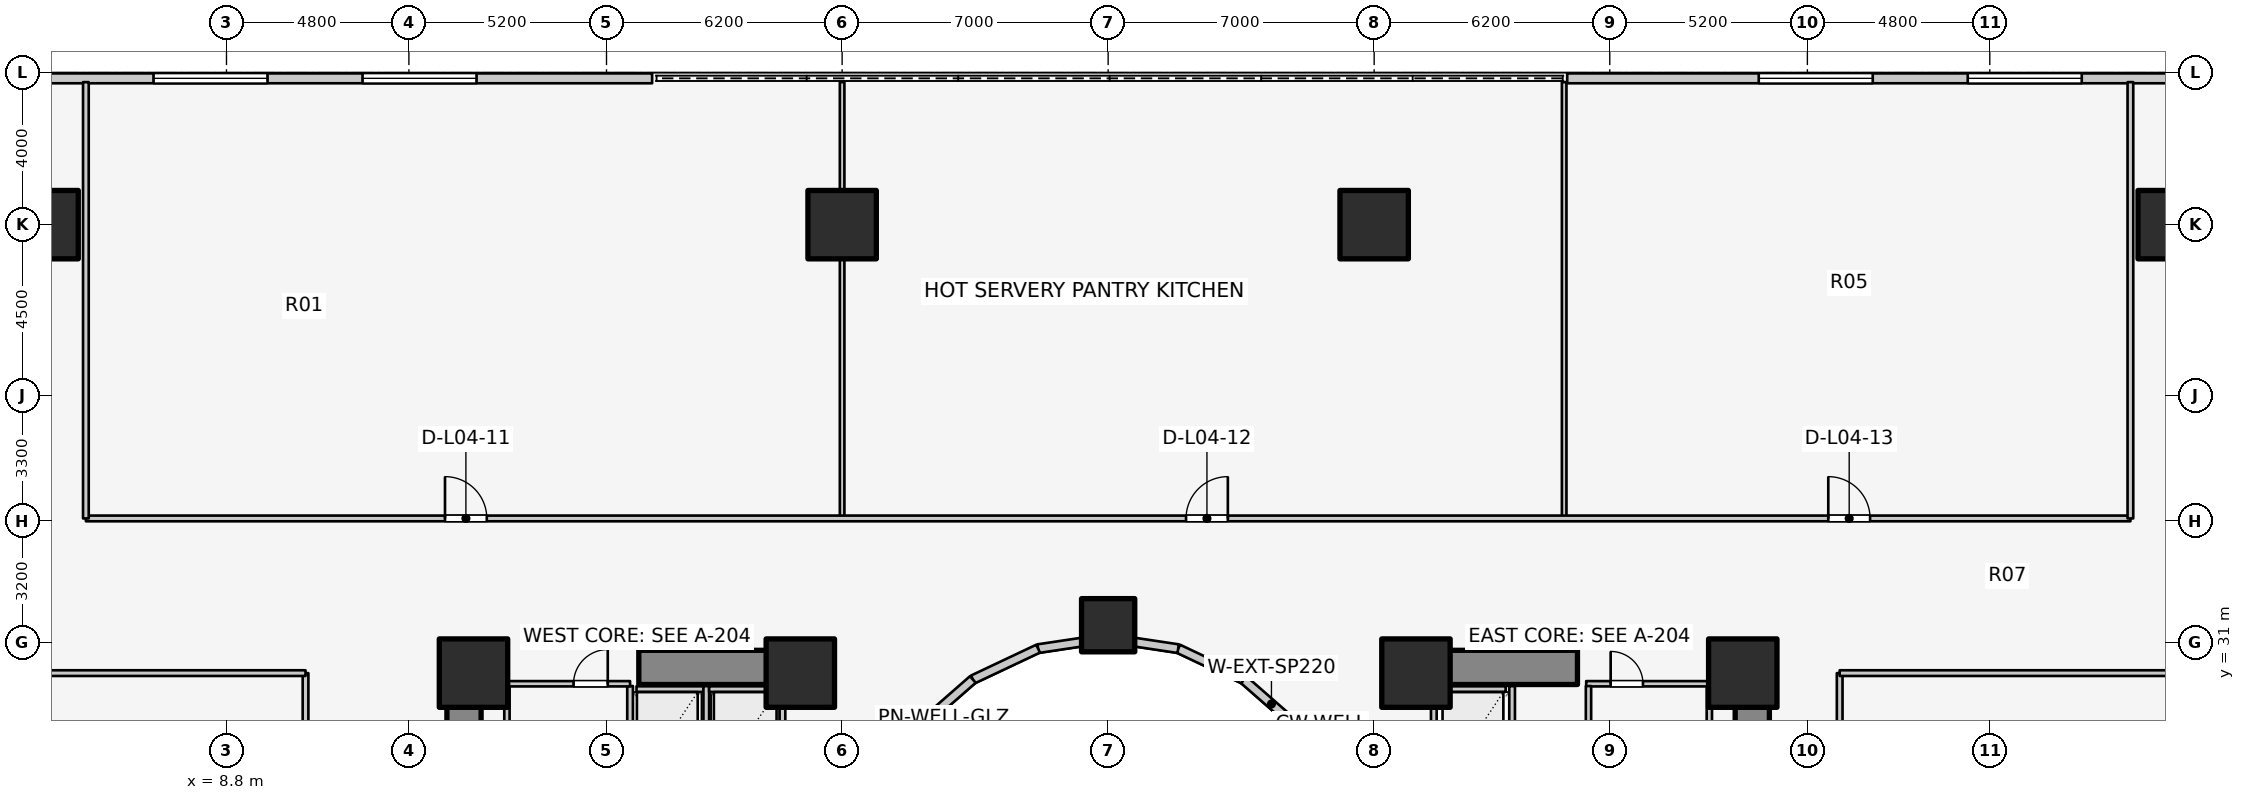
"""IFC4 building model, lengths in metres.
Left out: names, types, materials, properties, quantities, classifications, styles, units other than length and angle.
Written with IfcOpenShell. Run it as: python <this file> out.ifc"""

import sys

from ifc_helpers import new_model, si_unit, direction, frame, frame_2d, origin, origin_2d, place, context, subcontext, project, spatial, rectangle, extrude, element, fill, save


model = new_model("IFC4")
c1 = context("Model", 3, precision=1e-05, world=origin(), true_north=direction((0.0, 1.0)))
c2 = subcontext(c1, "Body", "Model", "MODEL_VIEW")
j1 = project(units=[si_unit("LENGTHUNIT", "METRE"), si_unit("PLANEANGLEUNIT", "RADIAN")], contexts=[c1])
p1 = place(None, origin())
s1 = spatial("IfcSite", under=j1, at=p1, CompositionType="ELEMENT")
p2 = place(p1, origin())
s2 = spatial("IfcBuilding", under=s1, at=p2, CompositionType="ELEMENT")
p3 = place(p2, frame((0.0, 0.0, 13.8)))
s3 = spatial("IfcBuildingStorey", under=s2, at=p3, CompositionType="ELEMENT", Elevation=13.8)
p4 = place(p3, frame((15.05, 17.05, 0.0), z_axis=(0.0, 0.0, 1.0), x_axis=(0.0, 1.0, 0.0)))
e1 = element("IfcWall", 1, at=p4, inside=s3, PredefinedType="SHEAR", context=c2, shape_type="SweptSolid", body=[
    extrude(rectangle(XDim=12.8, YDim=0.9, at=frame_2d((6.4, 0.0))), origin(), (0.0, 0.0, 1.0), 4.6),
])
p5 = place(p3, frame((19.65, 30.35, 0.0), z_axis=(0.0, 0.0, 1.0), x_axis=(1.0, 0.0, 0.0)))
e2 = element("IfcWall", 2, at=p5, inside=s3, PredefinedType="SHEAR", context=c2, shape_type="SweptSolid", body=[
    extrude(rectangle(XDim=4.5, YDim=0.9, at=frame_2d((2.25, 0.0))), origin(), (0.0, 0.0, 1.0), 4.6),
])
p6 = place(p3, frame((48.95, 17.05, 0.0), z_axis=(0.0, 0.0, 1.0), x_axis=(0.0, 1.0, 0.0)))
e3 = element("IfcWall", 3, at=p6, inside=s3, PredefinedType="SHEAR", context=c2, shape_type="SweptSolid", body=[
    extrude(rectangle(XDim=12.8, YDim=0.9, at=frame_2d((6.4, 0.0))), origin(), (0.0, 0.0, 1.0), 4.6),
])
p7 = place(p3, frame((39.85, 30.35, 0.0), z_axis=(0.0, 0.0, 1.0), x_axis=(1.0, 0.0, 0.0)))
e4 = element("IfcWall", 4, at=p7, inside=s3, PredefinedType="SHEAR", context=c2, shape_type="SweptSolid", body=[
    extrude(rectangle(XDim=4.5, YDim=0.9, at=frame_2d((2.25, 0.0))), origin(), (0.0, 0.0, 1.0), 4.6),
])
for number, where, z_axis, x_axis in (
    (5, (23.9, 30.2, 0.0), (0.0, 0.0, 1.0), (1.0, 0.0, 0.0)),
    (6, (15.3, 30.2, 0.0), (0.0, 0.0, 1.0), (1.0, 0.0, 0.0)),
    (7, (48.7, 30.2, 0.0), (0.0, 0.0, 1.0), (1.0, 0.0, 0.0)),
    (8, (40.1, 30.2, 0.0), (0.0, 0.0, 1.0), (1.0, 0.0, 0.0)),
    (9, (60.0, 42.0, 0.0), (0.0, 0.0, 1.0), (1.0, 0.0, 0.0)),
    (10, (39.0, 42.0, 0.0), (0.0, 0.0, 1.0), (1.0, 0.0, 0.0)),
    (11, (25.0, 42.0, 0.0), (0.0, 0.0, 1.0), (1.0, 0.0, 0.0)),
    (12, (4.0, 42.0, 0.0), (0.0, 0.0, 1.0), (1.0, 0.0, 0.0)),
):
    element("IfcColumn", number, at=place(p3, frame(where, z_axis=z_axis, x_axis=x_axis)), inside=s3, PredefinedType="COLUMN", context=c2, shape_type="SweptSolid", body=[
        extrude(rectangle(XDim=1.8, YDim=1.8, at=origin_2d()), origin(), (0.0, 0.0, 1.0), 4.6),
    ])
p8 = place(p3, frame((32.0, 31.46, 0.0), z_axis=(0.0, 0.0, 1.0), x_axis=(1.0, 0.0, 0.0)))
e13 = element("IfcColumn", 13, at=p8, inside=s3, PredefinedType="COLUMN", context=c2, shape_type="SweptSolid", body=[
    extrude(rectangle(XDim=1.4, YDim=1.4, at=origin_2d()), origin(), (0.0, 0.0, 1.0), 4.6),
])
p9 = place(p3, frame((63.72, 45.85, 0.0), z_axis=(0.0, 0.0, 1.0), x_axis=(-1.0, 0.0, 0.0)))
e14 = element("IfcWall", 14, at=p9, inside=s3, PredefinedType="STANDARD", context=c2, shape_type="SweptSolid", body=[
    extrude(rectangle(XDim=19.64, YDim=0.26, at=frame_2d((9.82, 0.0))), origin(), (0.0, 0.0, 1.0), 4.28),
])
p10 = place(p9, frame((6.1, 0.0, 0.9)))
e15 = element("IfcOpeningElement", 15, at=p10, cuts=e14, PredefinedType="OPENING", context=c2, shape_type="SweptSolid", body=[
    extrude(rectangle(XDim=3.0, YDim=2.4, at=frame_2d((1.5, 1.2))), frame((0.0, 0.14, 0.0), z_axis=(0.0, -1.0, 0.0), x_axis=(1.0, 0.0, 0.0)), (0.0, 0.0, 1.0), 0.28),
])
p11 = place(p9, frame((11.6, 0.0, 0.9)))
e16 = element("IfcOpeningElement", 16, at=p11, cuts=e14, PredefinedType="OPENING", context=c2, shape_type="SweptSolid", body=[
    extrude(rectangle(XDim=3.0, YDim=2.4, at=frame_2d((1.5, 1.2))), frame((0.0, 0.14, 0.0), z_axis=(0.0, -1.0, 0.0), x_axis=(1.0, 0.0, 0.0)), (0.0, 0.0, 1.0), 0.28),
])
p12 = place(p3, frame((20.0, 45.85, 0.0), z_axis=(0.0, 0.0, 1.0), x_axis=(-1.0, 0.0, 0.0)))
e17 = element("IfcWall", 17, at=p12, inside=s3, PredefinedType="STANDARD", context=c2, shape_type="SweptSolid", body=[
    extrude(rectangle(XDim=19.72, YDim=0.26, at=frame_2d((9.86, 0.0))), origin(), (0.0, 0.0, 1.0), 4.28),
])
p13 = place(p12, frame((4.62, 0.0, 0.9)))
e18 = element("IfcOpeningElement", 18, at=p13, cuts=e17, PredefinedType="OPENING", context=c2, shape_type="SweptSolid", body=[
    extrude(rectangle(XDim=3.0, YDim=2.4, at=frame_2d((1.5, 1.2))), frame((0.0, 0.14, 0.0), z_axis=(0.0, -1.0, 0.0), x_axis=(1.0, 0.0, 0.0)), (0.0, 0.0, 1.0), 0.28),
])
p14 = place(p12, frame((10.12, 0.0, 0.9)))
e19 = element("IfcOpeningElement", 19, at=p14, cuts=e17, PredefinedType="OPENING", context=c2, shape_type="SweptSolid", body=[
    extrude(rectangle(XDim=3.0, YDim=2.4, at=frame_2d((1.5, 1.2))), frame((0.0, 0.14, 0.0), z_axis=(0.0, -1.0, 0.0), x_axis=(1.0, 0.0, 0.0)), (0.0, 0.0, 1.0), 0.28),
])
p15 = place(p3, frame((37.035, 28.742, 0.0), z_axis=(0.0, 0.0, 1.0), x_axis=(-0.752576694707, 0.658504607869, 0.0)))
e20 = element("IfcWall", 20, at=p15, inside=s3, PredefinedType="STANDARD", context=c2, shape_type="SweptSolid", body=[
    extrude(rectangle(XDim=1.959, YDim=0.23, at=frame_2d((0.98, 0.0))), origin(), (0.0, 0.0, 1.0), 3.28),
])
p16 = place(p3, frame((35.56, 30.032, 0.0), z_axis=(0.0, 0.0, 1.0), x_axis=(-0.904179699603, 0.427152280606, 0.0)))
e21 = element("IfcWall", 21, at=p16, inside=s3, PredefinedType="STANDARD", context=c2, shape_type="SweptSolid", body=[
    extrude(rectangle(XDim=1.899, YDim=0.23, at=frame_2d((0.95, 0.0))), origin(), (0.0, 0.0, 1.0), 3.28),
])
for number, where, z_axis, x_axis in (
    (22, (33.843, 30.843, 0.0), (0.0, 0.0, 1.0), (-0.989, 0.149, 0.0)),
    (23, (32.0, 31.12, 0.0), (0.0, 0.0, 1.0), (-0.989, -0.149, 0.0)),
):
    element("IfcWall", number, at=place(p3, frame(where, z_axis=z_axis, x_axis=x_axis)), inside=s3, PredefinedType="STANDARD", context=c2, shape_type="SweptSolid", body=[
        extrude(rectangle(XDim=1.864, YDim=0.23, at=frame_2d((0.932, 0.0))), origin(), (0.0, 0.0, 1.0), 3.28),
    ])
p17 = place(p3, frame((30.157, 30.843, 0.0), z_axis=(0.0, 0.0, 1.0), x_axis=(-0.904179699603, -0.427152280606, 0.0)))
e24 = element("IfcWall", 24, at=p17, inside=s3, PredefinedType="STANDARD", context=c2, shape_type="SweptSolid", body=[
    extrude(rectangle(XDim=1.899, YDim=0.23, at=frame_2d((0.95, 0.0))), origin(), (0.0, 0.0, 1.0), 3.28),
])
p18 = place(p3, frame((28.44, 30.032, 0.0), z_axis=(0.0, 0.0, 1.0), x_axis=(-0.752576694707, -0.658504607869, 0.0)))
e25 = element("IfcWall", 25, at=p18, inside=s3, PredefinedType="STANDARD", context=c2, shape_type="SweptSolid", body=[
    extrude(rectangle(XDim=1.959, YDim=0.23, at=frame_2d((0.98, 0.0))), origin(), (0.0, 0.0, 1.0), 3.28),
])
p19 = place(p3, frame((19.59, 29.78, 0.0), z_axis=(0.0, 0.0, 1.0), x_axis=(1.0, 0.0, 0.0)))
e26 = element("IfcWall", 26, at=p19, inside=s3, PredefinedType="SOLIDWALL", context=c2, shape_type="SweptSolid", body=[
    extrude(rectangle(XDim=1.76, YDim=0.15, at=frame_2d((0.88, 0.0))), origin(), (0.0, 0.0, 1.0), 4.255),
])
for number, where, z_axis, x_axis in (
    (27, (19.42, 27.14, 0.0), (0.0, 0.0, 1.0), (0.0, 1.0, 0.0)),
    (28, (21.425, 27.14, 0.0), (0.0, 0.0, 1.0), (0.0, 1.0, 0.0)),
):
    element("IfcWall", number, at=place(p3, frame(where, z_axis=z_axis, x_axis=x_axis)), inside=s3, PredefinedType="SOLIDWALL", context=c2, shape_type="SweptSolid", body=[
        extrude(rectangle(XDim=2.72, YDim=0.15, at=frame_2d((1.36, 0.0))), origin(), (0.0, 0.0, 1.0), 4.255),
    ])
p20 = place(p3, frame((21.5, 29.78, 0.0), z_axis=(0.0, 0.0, 1.0), x_axis=(1.0, 0.0, 0.0)))
e29 = element("IfcWall", 29, at=p20, inside=s3, PredefinedType="SOLIDWALL", context=c2, shape_type="SweptSolid", body=[
    extrude(rectangle(XDim=1.76, YDim=0.15, at=frame_2d((0.88, 0.0))), origin(), (0.0, 0.0, 1.0), 4.255),
])
p21 = place(p3, frame((23.43, 27.14, 0.0), z_axis=(0.0, 0.0, 1.0), x_axis=(0.0, 1.0, 0.0)))
e30 = element("IfcWall", 30, at=p21, inside=s3, PredefinedType="SOLIDWALL", context=c2, shape_type="SweptSolid", body=[
    extrude(rectangle(XDim=2.72, YDim=0.15, at=frame_2d((1.36, 0.0))), origin(), (0.0, 0.0, 1.0), 4.255),
])
p22 = place(p3, frame((40.74, 29.78, 0.0), z_axis=(0.0, 0.0, 1.0), x_axis=(1.0, 0.0, 0.0)))
e31 = element("IfcWall", 31, at=p22, inside=s3, PredefinedType="SOLIDWALL", context=c2, shape_type="SweptSolid", body=[
    extrude(rectangle(XDim=1.72, YDim=0.15, at=frame_2d((0.86, 0.0))), origin(), (0.0, 0.0, 1.0), 4.255),
])
for number, where, z_axis, x_axis in (
    (32, (40.57, 27.14, 0.0), (0.0, 0.0, 1.0), (0.0, 1.0, 0.0)),
    (33, (42.63, 27.14, 0.0), (0.0, 0.0, 1.0), (0.0, 1.0, 0.0)),
):
    element("IfcWall", number, at=place(p3, frame(where, z_axis=z_axis, x_axis=x_axis)), inside=s3, PredefinedType="SOLIDWALL", context=c2, shape_type="SweptSolid", body=[
        extrude(rectangle(XDim=2.72, YDim=0.15, at=frame_2d((1.36, 0.0))), origin(), (0.0, 0.0, 1.0), 4.255),
    ])
for number, where, z_axis, x_axis in (
    (34, (25.0, 34.32, 0.0), (0.0, 0.0, 1.0), (0.0, 1.0, 0.0)),
    (35, (44.0, 34.32, 0.0), (0.0, 0.0, 1.0), (0.0, 1.0, 0.0)),
):
    element("IfcWall", number, at=place(p3, frame(where, z_axis=z_axis, x_axis=x_axis)), inside=s3, PredefinedType="MOVABLE", context=c2, shape_type="SweptSolid", body=[
        extrude(rectangle(XDim=11.43, YDim=0.12, at=frame_2d((5.715, 0.0))), origin(), (0.0, 0.0, 1.0), 3.3),
    ])
p23 = place(p3, frame((5.1, 34.27, 0.0), z_axis=(0.0, 0.0, 1.0), x_axis=(1.0, 0.0, 0.0)))
e36 = element("IfcWall", 36, at=p23, inside=s3, PredefinedType="PARTITIONING", context=c2, shape_type="SweptSolid", body=[
    extrude(rectangle(XDim=53.8, YDim=0.15, at=frame_2d((26.9, 0.0))), origin(), (0.0, 0.0, 1.0), 3.3),
])
p24 = place(p23, frame((9.45, 0.0, 0.0)))
e37 = element("IfcOpeningElement", 37, at=p24, cuts=e36, PredefinedType="OPENING", context=c2, shape_type="SweptSolid", body=[
    extrude(rectangle(XDim=1.1, YDim=2.1, at=frame_2d((0.55, 1.05))), frame((0.0, 0.085, 0.0), z_axis=(0.0, -1.0, 0.0), x_axis=(1.0, 0.0, 0.0)), (0.0, 0.0, 1.0), 0.17),
])
p25 = place(p23, frame((28.95, 0.0, 0.0)))
e38 = element("IfcOpeningElement", 38, at=p25, cuts=e36, PredefinedType="OPENING", context=c2, shape_type="SweptSolid", body=[
    extrude(rectangle(XDim=1.1, YDim=2.1, at=frame_2d((0.55, 1.05))), frame((0.0, 0.085, 0.0), z_axis=(0.0, -1.0, 0.0), x_axis=(1.0, 0.0, 0.0)), (0.0, 0.0, 1.0), 0.17),
])
p26 = place(p23, frame((45.85, 0.0, 0.0)))
e39 = element("IfcOpeningElement", 39, at=p26, cuts=e36, PredefinedType="OPENING", context=c2, shape_type="SweptSolid", body=[
    extrude(rectangle(XDim=1.1, YDim=2.1, at=frame_2d((0.55, 1.05))), frame((0.0, 0.085, 0.0), z_axis=(0.0, -1.0, 0.0), x_axis=(1.0, 0.0, 0.0)), (0.0, 0.0, 1.0), 0.17),
])
for number, where, z_axis, x_axis in (
    (40, (5.1, 34.27, 0.0), (0.0, 0.0, 1.0), (0.0, 1.0, 0.0)),
    (41, (58.9, 34.27, 0.0), (0.0, 0.0, 1.0), (0.0, 1.0, 0.0)),
):
    element("IfcWall", number, at=place(p3, frame(where, z_axis=z_axis, x_axis=x_axis)), inside=s3, PredefinedType="PARTITIONING", context=c2, shape_type="SweptSolid", body=[
        extrude(rectangle(XDim=11.48, YDim=0.15, at=frame_2d((5.74, 0.0))), origin(), (0.0, 0.0, 1.0), 3.3),
    ])
p27 = place(p3, frame((51.25, 16.75, 0.0), z_axis=(0.0, 0.0, 1.0), x_axis=(0.0, 1.0, 0.0)))
e42 = element("IfcWall", 42, at=p27, inside=s3, PredefinedType="PARTITIONING", context=c2, shape_type="SweptSolid", body=[
    extrude(rectangle(XDim=13.45, YDim=0.15, at=frame_2d((6.725, 0.0))), origin(), (0.0, 0.0, 1.0), 4.255),
])
p28 = place(p27, frame((6.175, 0.0, 0.0)))
e43 = element("IfcOpeningElement", 43, at=p28, cuts=e42, PredefinedType="OPENING", context=c2, shape_type="SweptSolid", body=[
    extrude(rectangle(XDim=1.1, YDim=2.1, at=frame_2d((0.55, 1.05))), frame((0.0, 0.085, 0.0), z_axis=(0.0, -1.0, 0.0), x_axis=(1.0, 0.0, 0.0)), (0.0, 0.0, 1.0), 0.17),
])
p29 = place(p3, frame((51.25, 30.2, 0.0), z_axis=(0.0, 0.0, 1.0), x_axis=(1.0, 0.0, 0.0)))
e44 = element("IfcWall", 44, at=p29, inside=s3, PredefinedType="PARTITIONING", context=c2, shape_type="SweptSolid", body=[
    extrude(rectangle(XDim=12.53, YDim=0.15, at=frame_2d((6.265, 0.0))), origin(), (0.0, 0.0, 1.0), 3.3),
])
p30 = place(p3, frame((10.88, 19.12, 0.0), z_axis=(0.0, 0.0, 1.0), x_axis=(0.0, 1.0, 0.0)))
e45 = element("IfcWall", 45, at=p30, inside=s3, PredefinedType="PARTITIONING", context=c2, shape_type="SweptSolid", body=[
    extrude(rectangle(XDim=11.08, YDim=0.15, at=frame_2d((5.54, 0.0))), origin(), (0.0, 0.0, 1.0), 3.62),
])
p31 = place(p3, frame((0.25, 30.2, 0.0), z_axis=(0.0, 0.0, 1.0), x_axis=(1.0, 0.0, 0.0)))
e46 = element("IfcWall", 46, at=p31, inside=s3, PredefinedType="PARTITIONING", context=c2, shape_type="SweptSolid", body=[
    extrude(rectangle(XDim=10.63, YDim=0.15, at=frame_2d((5.315, 0.0))), origin(), (0.0, 0.0, 1.0), 3.3),
])
p32 = place(p3, frame((16.12, 29.92, 0.0), z_axis=(0.0, 0.0, 1.0), x_axis=(1.0, 0.0, 0.0)))
e47 = element("IfcWall", 47, at=p32, inside=s3, PredefinedType="PLUMBINGWALL", context=c2, shape_type="SweptSolid", body=[
    extrude(rectangle(XDim=3.3, YDim=0.14, at=frame_2d((1.65, 0.0))), origin(), (0.0, 0.0, 1.0), 4.255),
])
p33 = place(p32, frame((1.813, 0.0, 0.0)))
e48 = element("IfcOpeningElement", 48, at=p33, cuts=e47, PredefinedType="OPENING", context=c2, shape_type="SweptSolid", body=[
    extrude(rectangle(XDim=0.9, YDim=2.1, at=frame_2d((0.45, 1.05))), frame((0.0, 0.08, 0.0), z_axis=(0.0, -1.0, 0.0), x_axis=(1.0, 0.0, 0.0)), (0.0, 0.0, 1.0), 0.16),
])
p34 = place(p3, frame((16.18, 25.98, 0.0), z_axis=(0.0, 0.0, 1.0), x_axis=(0.0, 1.0, 0.0)))
e49 = element("IfcWall", 49, at=p34, inside=s3, PredefinedType="PLUMBINGWALL", context=c2, shape_type="SweptSolid", body=[
    extrude(rectangle(XDim=3.88, YDim=0.14, at=frame_2d((1.94, 0.0))), origin(), (0.0, 0.0, 1.0), 4.255),
])
p35 = place(p3, frame((44.58, 29.92, 0.0), z_axis=(0.0, 0.0, 1.0), x_axis=(1.0, 0.0, 0.0)))
e50 = element("IfcWall", 50, at=p35, inside=s3, PredefinedType="PLUMBINGWALL", context=c2, shape_type="SweptSolid", body=[
    extrude(rectangle(XDim=3.3, YDim=0.14, at=frame_2d((1.65, 0.0))), origin(), (0.0, 0.0, 1.0), 4.255),
])
p36 = place(p35, frame((0.643, 0.0, 0.0)))
e51 = element("IfcOpeningElement", 51, at=p36, cuts=e50, PredefinedType="OPENING", context=c2, shape_type="SweptSolid", body=[
    extrude(rectangle(XDim=0.85, YDim=2.05, at=frame_2d((0.425, 1.025))), frame((0.0, 0.08, 0.0), z_axis=(0.0, -1.0, 0.0), x_axis=(1.0, 0.0, 0.0)), (0.0, 0.0, 1.0), 0.16),
])
for number, where, z_axis, x_axis in (
    (52, (44.64, 25.98, 0.0), (0.0, 0.0, 1.0), (0.0, 1.0, 0.0)),
    (53, (47.82, 25.98, 0.0), (0.0, 0.0, 1.0), (0.0, 1.0, 0.0)),
):
    element("IfcWall", number, at=place(p3, frame(where, z_axis=z_axis, x_axis=x_axis)), inside=s3, PredefinedType="PLUMBINGWALL", context=c2, shape_type="SweptSolid", body=[
        extrude(rectangle(XDim=3.88, YDim=0.14, at=frame_2d((1.94, 0.0))), origin(), (0.0, 0.0, 1.0), 4.255),
    ])
p37 = place(p10, origin())
e54 = element("IfcWindow", 54, at=p37, inside=s3, PartitioningType="SINGLE_PANEL", PredefinedType="WINDOW", context=c2, shape_type="SweptSolid", body=[
    extrude(rectangle(XDim=3.0, YDim=2.4, at=frame_2d((1.5, 1.2))), frame((0.0, 0.03, 0.0), z_axis=(0.0, -1.0, 0.0), x_axis=(1.0, 0.0, 0.0)), (0.0, 0.0, 1.0), 0.06),
])
fill(e15, e54)
p38 = place(p11, origin())
e55 = element("IfcWindow", 55, at=p38, inside=s3, PartitioningType="SINGLE_PANEL", PredefinedType="WINDOW", context=c2, shape_type="SweptSolid", body=[
    extrude(rectangle(XDim=3.0, YDim=2.4, at=frame_2d((1.5, 1.2))), frame((0.0, 0.03, 0.0), z_axis=(0.0, -1.0, 0.0), x_axis=(1.0, 0.0, 0.0)), (0.0, 0.0, 1.0), 0.06),
])
fill(e16, e55)
p39 = place(p13, origin())
e56 = element("IfcWindow", 56, at=p39, inside=s3, PartitioningType="SINGLE_PANEL", PredefinedType="WINDOW", context=c2, shape_type="SweptSolid", body=[
    extrude(rectangle(XDim=3.0, YDim=2.4, at=frame_2d((1.5, 1.2))), frame((0.0, 0.03, 0.0), z_axis=(0.0, -1.0, 0.0), x_axis=(1.0, 0.0, 0.0)), (0.0, 0.0, 1.0), 0.06),
])
fill(e18, e56)
p40 = place(p14, origin())
e57 = element("IfcWindow", 57, at=p40, inside=s3, PartitioningType="SINGLE_PANEL", PredefinedType="WINDOW", context=c2, shape_type="SweptSolid", body=[
    extrude(rectangle(XDim=3.0, YDim=2.4, at=frame_2d((1.5, 1.2))), frame((0.0, 0.03, 0.0), z_axis=(0.0, -1.0, 0.0), x_axis=(1.0, 0.0, 0.0)), (0.0, 0.0, 1.0), 0.06),
])
fill(e19, e57)
p41 = place(p24, origin())
e58 = element("IfcDoor", 58, at=p41, inside=s3, OperationType="SINGLE_SWING_LEFT", PredefinedType="DOOR", context=c2, shape_type="SweptSolid", body=[
    extrude(rectangle(XDim=1.1, YDim=2.1, at=frame_2d((0.55, 1.05))), frame((0.0, 0.025, 0.0), z_axis=(0.0, -1.0, 0.0), x_axis=(1.0, 0.0, 0.0)), (0.0, 0.0, 1.0), 0.05),
])
fill(e37, e58)
p42 = place(p25, origin())
e59 = element("IfcDoor", 59, at=p42, inside=s3, OperationType="SINGLE_SWING_RIGHT", PredefinedType="DOOR", context=c2, shape_type="SweptSolid", body=[
    extrude(rectangle(XDim=1.1, YDim=2.1, at=frame_2d((0.55, 1.05))), frame((0.0, 0.025, 0.0), z_axis=(0.0, -1.0, 0.0), x_axis=(1.0, 0.0, 0.0)), (0.0, 0.0, 1.0), 0.05),
])
fill(e38, e59)
p43 = place(p26, origin())
e60 = element("IfcDoor", 60, at=p43, inside=s3, OperationType="SINGLE_SWING_LEFT", PredefinedType="DOOR", context=c2, shape_type="SweptSolid", body=[
    extrude(rectangle(XDim=1.1, YDim=2.1, at=frame_2d((0.55, 1.05))), frame((0.0, 0.025, 0.0), z_axis=(0.0, -1.0, 0.0), x_axis=(1.0, 0.0, 0.0)), (0.0, 0.0, 1.0), 0.05),
])
fill(e39, e60)
p44 = place(p33, origin())
e61 = element("IfcDoor", 61, at=p44, inside=s3, OperationType="SINGLE_SWING_RIGHT", PredefinedType="DOOR", context=c2, shape_type="SweptSolid", body=[
    extrude(rectangle(XDim=0.9, YDim=2.1, at=frame_2d((0.45, 1.05))), frame((0.0, 0.025, 0.0), z_axis=(0.0, -1.0, 0.0), x_axis=(1.0, 0.0, 0.0)), (0.0, 0.0, 1.0), 0.05),
])
fill(e48, e61)
p45 = place(p36, origin())
e62 = element("IfcDoor", 62, at=p45, inside=s3, OperationType="SINGLE_SWING_LEFT", PredefinedType="DOOR", context=c2, shape_type="SweptSolid", body=[
    extrude(rectangle(XDim=0.85, YDim=2.05, at=frame_2d((0.425, 1.025))), frame((0.0, 0.025, 0.0), z_axis=(0.0, -1.0, 0.0), x_axis=(1.0, 0.0, 0.0)), (0.0, 0.0, 1.0), 0.05),
])
fill(e51, e62)
save(model, sys.argv[1])
